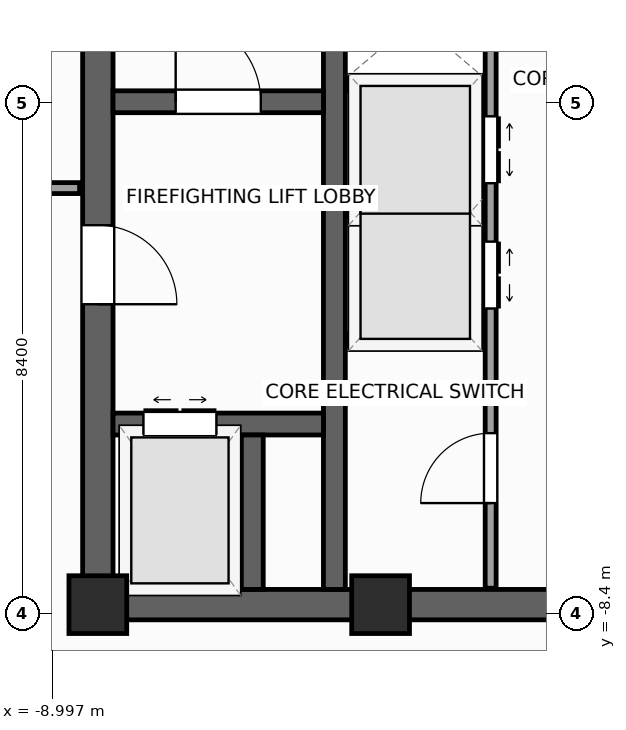
"""IFC4 building model, lengths in metres.
Left out: names, types, materials, properties, quantities, classifications, styles, units other than length and angle.
Written with IfcOpenShell. Run it as: python <this file> out.ifc"""

import sys

from ifc_helpers import new_model, si_unit, direction, frame, frame_2d, origin, origin_2d, place, context, subcontext, project, spatial, rectangle, extrude, source, transform, mapped, element, fill, save


model = new_model("IFC4")
c1 = context("Model", 3, precision=1e-05, world=origin(), true_north=direction((0.0, 1.0)))
c2 = subcontext(c1, "Body", "Model", "MODEL_VIEW")
j1 = project(units=[si_unit("LENGTHUNIT", "METRE"), si_unit("PLANEANGLEUNIT", "RADIAN")], contexts=[c1])
p1 = place(None, origin())
s1 = spatial("IfcSite", under=j1, at=p1, CompositionType="ELEMENT")
p2 = place(p1, origin())
s2 = spatial("IfcBuilding", under=s1, at=p2, CompositionType="ELEMENT")
p3 = place(p2, frame((0.0, 0.0, 213.4)))
s3 = spatial("IfcBuildingStorey", under=s2, at=p3, CompositionType="ELEMENT", Elevation=213.4)
p4 = place(p3, frame((-8.5, -8.25, 0.0), z_axis=(0.0, 0.0, 1.0), x_axis=(1.0, 0.0, 0.0)))
e1 = element("IfcWall", 1, at=p4, inside=s3, PredefinedType="SHEAR", context=c2, shape_type="SweptSolid", body=[
    extrude(rectangle(XDim=17.0, YDim=0.5, at=frame_2d((8.5, 0.0))), origin(), (0.0, 0.0, 1.0), 3.9),
])
p5 = place(p4, frame((7.85, 0.0, 0.0)))
e2 = element("IfcOpeningElement", 2, at=p5, cuts=e1, PredefinedType="OPENING", context=c2, shape_type="SweptSolid", body=[
    extrude(rectangle(XDim=1.3, YDim=2.2, at=frame_2d((0.65, 1.1))), frame((0.0, 0.26, 0.0), z_axis=(0.0, -1.0, 0.0), x_axis=(1.0, 0.0, 0.0)), (0.0, 0.0, 1.0), 0.52),
])
p6 = place(p3, frame((-8.25, -8.0, 0.0), z_axis=(0.0, 0.0, 1.0), x_axis=(0.0, 1.0, 0.0)))
e3 = element("IfcWall", 3, at=p6, inside=s3, PredefinedType="SHEAR", context=c2, shape_type="SweptSolid", body=[
    extrude(rectangle(XDim=16.0, YDim=0.5, at=frame_2d((8.0, 0.0))), origin(), (0.0, 0.0, 1.0), 3.9),
])
p7 = place(p6, frame((4.69, 0.0, 0.0)))
e4 = element("IfcOpeningElement", 4, at=p7, cuts=e3, PredefinedType="OPENING", context=c2, shape_type="SweptSolid", body=[
    extrude(rectangle(XDim=1.3, YDim=2.2, at=frame_2d((0.65, 1.1))), frame((0.0, 0.26, 0.0), z_axis=(0.0, -1.0, 0.0), x_axis=(1.0, 0.0, 0.0)), (0.0, 0.0, 1.0), 0.52),
])
p8 = place(p3, frame((-4.36, -8.0, 0.0), z_axis=(0.0, 0.0, 1.0), x_axis=(0.0, 1.0, 0.0)))
e5 = element("IfcWall", 5, at=p8, inside=s3, PredefinedType="SHEAR", context=c2, shape_type="SweptSolid", body=[
    extrude(rectangle(XDim=16.0, YDim=0.36, at=frame_2d((8.0, 0.0))), origin(), (0.0, 0.0, 1.0), 3.9),
])
p9 = place(p3, frame((-8.0, 0.02, 0.0), z_axis=(0.0, 0.0, 1.0), x_axis=(1.0, 0.0, 0.0)))
e6 = element("IfcWall", 6, at=p9, inside=s3, PredefinedType="SHEAR", context=c2, shape_type="SweptSolid", body=[
    extrude(rectangle(XDim=3.46, YDim=0.36, at=frame_2d((1.73, 0.0))), origin(), (0.0, 0.0, 1.0), 3.9),
])
p10 = place(p9, frame((1.03, 0.0, 0.0)))
e7 = element("IfcOpeningElement", 7, at=p10, cuts=e6, PredefinedType="OPENING", context=c2, shape_type="SweptSolid", body=[
    extrude(rectangle(XDim=1.4, YDim=2.2, at=frame_2d((0.7, 1.1))), frame((0.0, 0.19, 0.0), z_axis=(0.0, -1.0, 0.0), x_axis=(1.0, 0.0, 0.0)), (0.0, 0.0, 1.0), 0.38),
])
p11 = place(p3, frame((-8.0, -5.28, 0.0), z_axis=(0.0, 0.0, 1.0), x_axis=(1.0, 0.0, 0.0)))
e8 = element("IfcWall", 8, at=p11, inside=s3, PredefinedType="SHEAR", context=c2, shape_type="SweptSolid", body=[
    extrude(rectangle(XDim=3.46, YDim=0.36, at=frame_2d((1.73, 0.0))), origin(), (0.0, 0.0, 1.0), 3.9),
])
p12 = place(p11, frame((0.5, 0.0, 0.0)))
e9 = element("IfcOpeningElement", 9, at=p12, cuts=e8, PredefinedType="OPENING", context=c2, shape_type="SweptSolid", body=[
    extrude(rectangle(XDim=1.2, YDim=2.25, at=frame_2d((0.6, 1.125))), frame((0.0, 0.19, 0.0), z_axis=(0.0, -1.0, 0.0), x_axis=(1.0, 0.0, 0.0)), (0.0, 0.0, 1.0), 0.38),
])
p13 = place(p3, frame((-5.71, -8.0, 0.0), z_axis=(0.0, 0.0, 1.0), x_axis=(0.0, 1.0, 0.0)))
e10 = element("IfcWall", 10, at=p13, inside=s3, PredefinedType="SHEAR", context=c2, shape_type="SweptSolid", body=[
    extrude(rectangle(XDim=2.54, YDim=0.36, at=frame_2d((1.27, 0.0))), origin(), (0.0, 0.0, 1.0), 3.9),
])
m1 = source(origin(), c2, "Body", "SweptSolid", [
    extrude(rectangle(XDim=0.95, YDim=0.95, at=origin_2d()), origin(), (0.0, 0.0, 1.0), 3.9),
])
for number, where, z_axis, x_axis in (
    (11, (-8.25, -8.25, 0.0), (0.0, 0.0, 1.0), (1.0, 0.0, 0.0)),
    (12, (-3.6, -8.25, 0.0), (0.0, 0.0, 1.0), (1.0, 0.0, 0.0)),
):
    element("IfcColumn", number, at=place(p3, frame(where, z_axis=z_axis, x_axis=x_axis)), inside=s3, PredefinedType="PILASTER", context=c2, shape_type="MappedRepresentation", body=[
        mapped(m1, transform((0.0, 0.0, 0.0), scale=1.0)),
    ])
p14 = place(p3, frame((-6.733, 29.154, 0.0), z_axis=(0.0, 0.0, 1.0), x_axis=(-0.629325378072, -0.77714192302, 0.0)))
e13 = element("IfcWall", 13, at=p14, inside=s3, PredefinedType="STANDARD", context=c2, shape_type="SweptSolid", body=[
    extrude(rectangle(XDim=36.84, YDim=0.34, at=frame_2d((18.42, 0.0))), origin(), (0.0, 0.0, 1.0), 2.96),
])
p15 = place(p14, frame((12.295, 0.0, 0.0)))
e14 = element("IfcOpeningElement", 14, at=p15, cuts=e13, PredefinedType="OPENING", context=c2, shape_type="SweptSolid", body=[
    extrude(rectangle(XDim=1.05, YDim=2.25, at=frame_2d((0.525, 1.125))), frame((0.0, 0.18, 0.0), z_axis=(0.0, -1.0, 0.0), x_axis=(1.0, 0.0, 0.0)), (0.0, 0.0, 1.0), 0.36),
])
p16 = place(p14, frame((3.721, 0.0, 0.48)))
e15 = element("IfcOpeningElement", 15, at=p16, cuts=e13, PredefinedType="OPENING", context=c2, shape_type="SweptSolid", body=[
    extrude(rectangle(XDim=1.4, YDim=2.4, at=frame_2d((0.7, 1.2))), frame((0.0, 0.18, 0.0), z_axis=(0.0, -1.0, 0.0), x_axis=(1.0, 0.0, 0.0)), (0.0, 0.0, 1.0), 0.36),
])
p17 = place(p14, frame((9.059, 0.0, 0.58)))
e16 = element("IfcOpeningElement", 16, at=p17, cuts=e13, PredefinedType="OPENING", context=c2, shape_type="SweptSolid", body=[
    extrude(rectangle(XDim=1.75, YDim=2.3, at=frame_2d((0.875, 1.15))), frame((0.0, 0.18, 0.0), z_axis=(0.0, -1.0, 0.0), x_axis=(1.0, 0.0, 0.0)), (0.0, 0.0, 1.0), 0.36),
])
p18 = place(p14, frame((16.058, 0.0, 0.58)))
e17 = element("IfcOpeningElement", 17, at=p18, cuts=e13, PredefinedType="OPENING", context=c2, shape_type="SweptSolid", body=[
    extrude(rectangle(XDim=1.75, YDim=2.3, at=frame_2d((0.875, 1.15))), frame((0.0, 0.18, 0.0), z_axis=(0.0, -1.0, 0.0), x_axis=(1.0, 0.0, 0.0)), (0.0, 0.0, 1.0), 0.36),
])
p19 = place(p14, frame((24.176, 0.0, 0.58)))
e18 = element("IfcOpeningElement", 18, at=p19, cuts=e13, PredefinedType="OPENING", context=c2, shape_type="SweptSolid", body=[
    extrude(rectangle(XDim=1.75, YDim=2.3, at=frame_2d((0.875, 1.15))), frame((0.0, 0.18, 0.0), z_axis=(0.0, -1.0, 0.0), x_axis=(1.0, 0.0, 0.0)), (0.0, 0.0, 1.0), 0.36),
])
p20 = place(p14, frame((30.982, 0.0, 0.48)))
e19 = element("IfcOpeningElement", 19, at=p20, cuts=e13, PredefinedType="OPENING", context=c2, shape_type="SweptSolid", body=[
    extrude(rectangle(XDim=1.4, YDim=2.4, at=frame_2d((0.7, 1.2))), frame((0.0, 0.18, 0.0), z_axis=(0.0, -1.0, 0.0), x_axis=(1.0, 0.0, 0.0)), (0.0, 0.0, 1.0), 0.36),
])
p21 = place(p3, frame((-29.154, -6.733, 0.0), z_axis=(0.0, 0.0, 1.0), x_axis=(0.77714192302, -0.629325378072, 0.0)))
e20 = element("IfcWall", 20, at=p21, inside=s3, PredefinedType="STANDARD", context=c2, shape_type="SweptSolid", body=[
    extrude(rectangle(XDim=36.84, YDim=0.34, at=frame_2d((18.42, 0.0))), origin(), (0.0, 0.0, 1.0), 2.96),
])
p22 = place(p21, frame((3.721, 0.0, 0.48)))
e21 = element("IfcOpeningElement", 21, at=p22, cuts=e20, PredefinedType="OPENING", context=c2, shape_type="SweptSolid", body=[
    extrude(rectangle(XDim=1.4, YDim=2.4, at=frame_2d((0.7, 1.2))), frame((0.0, 0.18, 0.0), z_axis=(0.0, -1.0, 0.0), x_axis=(1.0, 0.0, 0.0)), (0.0, 0.0, 1.0), 0.36),
])
p23 = place(p21, frame((9.809, 0.0, 0.58)))
e22 = element("IfcOpeningElement", 22, at=p23, cuts=e20, PredefinedType="OPENING", context=c2, shape_type="SweptSolid", body=[
    extrude(rectangle(XDim=1.75, YDim=2.3, at=frame_2d((0.875, 1.15))), frame((0.0, 0.18, 0.0), z_axis=(0.0, -1.0, 0.0), x_axis=(1.0, 0.0, 0.0)), (0.0, 0.0, 1.0), 0.36),
])
p24 = place(p21, frame((16.058, 0.0, 0.58)))
e23 = element("IfcOpeningElement", 23, at=p24, cuts=e20, PredefinedType="OPENING", context=c2, shape_type="SweptSolid", body=[
    extrude(rectangle(XDim=1.75, YDim=2.3, at=frame_2d((0.875, 1.15))), frame((0.0, 0.18, 0.0), z_axis=(0.0, -1.0, 0.0), x_axis=(1.0, 0.0, 0.0)), (0.0, 0.0, 1.0), 0.36),
])
p25 = place(p21, frame((24.176, 0.0, 0.58)))
e24 = element("IfcOpeningElement", 24, at=p25, cuts=e20, PredefinedType="OPENING", context=c2, shape_type="SweptSolid", body=[
    extrude(rectangle(XDim=1.75, YDim=2.3, at=frame_2d((0.875, 1.15))), frame((0.0, 0.18, 0.0), z_axis=(0.0, -1.0, 0.0), x_axis=(1.0, 0.0, 0.0)), (0.0, 0.0, 1.0), 0.36),
])
p26 = place(p21, frame((30.982, 0.0, 0.48)))
e25 = element("IfcOpeningElement", 25, at=p26, cuts=e20, PredefinedType="OPENING", context=c2, shape_type="SweptSolid", body=[
    extrude(rectangle(XDim=1.4, YDim=2.4, at=frame_2d((0.7, 1.2))), frame((0.0, 0.18, 0.0), z_axis=(0.0, -1.0, 0.0), x_axis=(1.0, 0.0, 0.0)), (0.0, 0.0, 1.0), 0.36),
])
p27 = place(p3, frame((-1.79, -7.98, 0.0), z_axis=(0.0, 0.0, 1.0), x_axis=(0.0, 1.0, 0.0)))
e26 = element("IfcWall", 26, at=p27, inside=s3, PredefinedType="PARTITIONING", context=c2, shape_type="SweptSolid", body=[
    extrude(rectangle(XDim=12.38, YDim=0.18, at=frame_2d((6.19, 0.0))), origin(), (0.0, 0.0, 1.0), 3.66),
])
p28 = place(p27, frame((4.6, 0.0, 0.0)))
e27 = element("IfcOpeningElement", 27, at=p28, cuts=e26, PredefinedType="OPENING", context=c2, shape_type="SweptSolid", body=[
    extrude(rectangle(XDim=1.1, YDim=2.2, at=frame_2d((0.55, 1.1))), frame((0.0, 0.1, 0.0), z_axis=(0.0, -1.0, 0.0), x_axis=(1.0, 0.0, 0.0)), (0.0, 0.0, 1.0), 0.2),
])
p29 = place(p27, frame((6.66, 0.0, 0.0)))
e28 = element("IfcOpeningElement", 28, at=p29, cuts=e26, PredefinedType="OPENING", context=c2, shape_type="SweptSolid", body=[
    extrude(rectangle(XDim=1.1, YDim=2.2, at=frame_2d((0.55, 1.1))), frame((0.0, 0.1, 0.0), z_axis=(0.0, -1.0, 0.0), x_axis=(1.0, 0.0, 0.0)), (0.0, 0.0, 1.0), 0.2),
])
p30 = place(p27, frame((1.4, 0.0, 0.0)))
e29 = element("IfcOpeningElement", 29, at=p30, cuts=e26, PredefinedType="OPENING", context=c2, shape_type="SweptSolid", body=[
    extrude(rectangle(XDim=1.15, YDim=2.25, at=frame_2d((0.575, 1.125))), frame((0.0, 0.1, 0.0), z_axis=(0.0, -1.0, 0.0), x_axis=(1.0, 0.0, 0.0)), (0.0, 0.0, 1.0), 0.2),
])
for number, where, z_axis, x_axis in (
    (30, (-4.17, -3.9, 0.0), (0.0, 0.0, 1.0), (1.0, 0.0, 0.0)),
    (31, (-4.17, 0.3, 0.0), (0.0, 0.0, 1.0), (1.0, 0.0, 0.0)),
):
    element("IfcWall", number, at=place(p3, frame(where, z_axis=z_axis, x_axis=x_axis)), inside=s3, PredefinedType="PARTITIONING", context=c2, shape_type="SweptSolid", body=[
        extrude(rectangle(XDim=2.28, YDim=0.18, at=frame_2d((1.14, 0.0))), origin(), (0.0, 0.0, 1.0), 3.66),
    ])
p31 = place(p3, frame((-4.16, -1.8, 0.0), z_axis=(0.0, 0.0, 1.0), x_axis=(1.0, 0.0, 0.0)))
e32 = element("IfcWall", 32, at=p31, inside=s3, PredefinedType="PARTITIONING", context=c2, shape_type="SweptSolid", body=[
    extrude(rectangle(XDim=2.26, YDim=0.12, at=frame_2d((1.13, 0.0))), origin(), (0.0, 0.0, 1.0), 3.66),
])
p32 = place(p3, frame((-11.45, -1.4, 0.0), z_axis=(0.0, 0.0, 1.0), x_axis=(1.0, 0.0, 0.0)))
e33 = element("IfcWall", 33, at=p32, inside=s3, PredefinedType="PARTITIONING", context=c2, shape_type="SweptSolid", body=[
    extrude(rectangle(XDim=2.9, YDim=0.18, at=frame_2d((1.45, 0.0))), origin(), (0.0, 0.0, 1.0), 3.66),
])
p33 = place(p32, frame((0.9, 0.0, 0.0)))
e34 = element("IfcOpeningElement", 34, at=p33, cuts=e33, PredefinedType="OPENING", context=c2, shape_type="SweptSolid", body=[
    extrude(rectangle(XDim=1.1, YDim=2.2, at=frame_2d((0.55, 1.1))), frame((0.0, 0.1, 0.0), z_axis=(0.0, -1.0, 0.0), x_axis=(1.0, 0.0, 0.0)), (0.0, 0.0, 1.0), 0.2),
])
m2 = source(origin(), c2, "Body", "SweptSolid", [
    extrude(rectangle(XDim=1.4, YDim=2.2, at=frame_2d((0.7, 1.1))), frame((0.0, 0.025, 0.0), z_axis=(0.0, -1.0, 0.0), x_axis=(1.0, 0.0, 0.0)), (0.0, 0.0, 1.0), 0.05),
])
p34 = place(p10, origin())
e35 = element("IfcDoor", 35, at=p34, inside=s3, OperationType="SINGLE_SWING_LEFT", PredefinedType="DOOR", context=c2, shape_type="MappedRepresentation", body=[
    mapped(m2, transform((0.0, 0.0, 0.0), scale=1.0)),
])
fill(e7, e35)
m3 = source(origin(), c2, "Body", "SweptSolid", [
    extrude(rectangle(XDim=1.3, YDim=2.2, at=frame_2d((0.65, 1.1))), frame((0.0, 0.025, 0.0), z_axis=(0.0, -1.0, 0.0), x_axis=(1.0, 0.0, 0.0)), (0.0, 0.0, 1.0), 0.05),
])
p35 = place(p7, frame((1.3, 0.0, 0.0), z_axis=(0.0, 0.0, 1.0), x_axis=(-1.0, 0.0, 0.0)))
e36 = element("IfcDoor", 36, at=p35, inside=s3, OperationType="SINGLE_SWING_LEFT", PredefinedType="DOOR", context=c2, shape_type="MappedRepresentation", body=[
    mapped(m3, transform((0.0, 0.0, 0.0), scale=1.0)),
])
fill(e4, e36)
m4 = source(origin(), c2, "Body", "SweptSolid", [
    extrude(rectangle(XDim=1.2, YDim=2.25, at=frame_2d((0.6, 1.125))), frame((0.0, 0.025, 0.0), z_axis=(0.0, -1.0, 0.0), x_axis=(1.0, 0.0, 0.0)), (0.0, 0.0, 1.0), 0.05),
])
p36 = place(p12, origin())
e37 = element("IfcDoor", 37, at=p36, inside=s3, OperationType="DOUBLE_DOOR_SLIDING", PredefinedType="DOOR", context=c2, shape_type="MappedRepresentation", body=[
    mapped(m4, transform((0.0, 0.0, 0.0), scale=1.0)),
])
fill(e9, e37)
m5 = source(origin(), c2, "Body", "SweptSolid", [
    extrude(rectangle(XDim=1.1, YDim=2.2, at=frame_2d((0.55, 1.1))), frame((0.0, 0.025, 0.0), z_axis=(0.0, -1.0, 0.0), x_axis=(1.0, 0.0, 0.0)), (0.0, 0.0, 1.0), 0.05),
])
p37 = place(p28, frame((1.1, 0.0, 0.0), z_axis=(0.0, 0.0, 1.0), x_axis=(-1.0, 0.0, 0.0)))
e38 = element("IfcDoor", 38, at=p37, inside=s3, OperationType="DOUBLE_DOOR_SLIDING", PredefinedType="DOOR", context=c2, shape_type="MappedRepresentation", body=[
    mapped(m5, transform((0.0, 0.0, 0.0), scale=1.0)),
])
fill(e27, e38)
p38 = place(p29, frame((1.1, 0.0, 0.0), z_axis=(0.0, 0.0, 1.0), x_axis=(-1.0, 0.0, 0.0)))
e39 = element("IfcDoor", 39, at=p38, inside=s3, OperationType="DOUBLE_DOOR_SLIDING", PredefinedType="DOOR", context=c2, shape_type="MappedRepresentation", body=[
    mapped(m5, transform((0.0, 0.0, 0.0), scale=1.0)),
])
fill(e28, e39)
m6 = source(origin(), c2, "Body", "SweptSolid", [
    extrude(rectangle(XDim=1.15, YDim=2.25, at=frame_2d((0.575, 1.125))), frame((0.0, 0.025, 0.0), z_axis=(0.0, -1.0, 0.0), x_axis=(1.0, 0.0, 0.0)), (0.0, 0.0, 1.0), 0.05),
])
p39 = place(p30, origin())
e40 = element("IfcDoor", 40, at=p39, inside=s3, OperationType="SINGLE_SWING_LEFT", PredefinedType="DOOR", context=c2, shape_type="MappedRepresentation", body=[
    mapped(m6, transform((0.0, 0.0, 0.0), scale=1.0)),
])
fill(e29, e40)
save(model, sys.argv[1])
